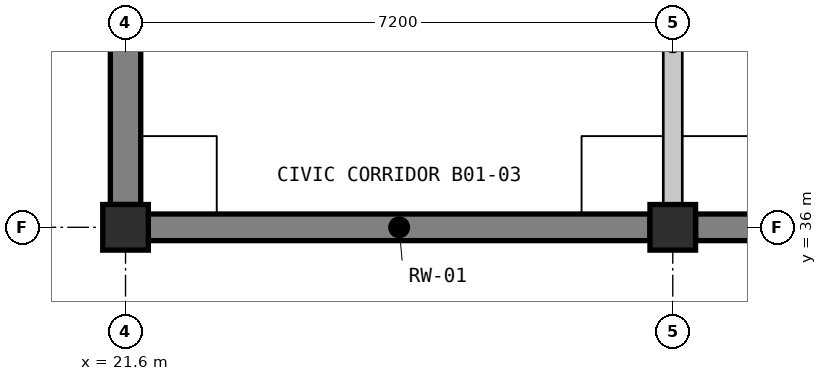
"""IFC4 building model, lengths in metres.
Left out: names, types, materials, properties, quantities, classifications, styles, units other than length and angle.
Written with IfcOpenShell. Run it as: python <this file> out.ifc"""

import sys

from ifc_helpers import new_model, si_unit, direction, frame, frame_2d, origin, origin_2d, place, context, subcontext, project, spatial, rectangle, extrude, element, save


model = new_model("IFC4")
c1 = context("Model", 3, precision=1e-05, world=origin(), true_north=direction((0.0, 1.0)))
c2 = subcontext(c1, "Body", "Model", "MODEL_VIEW")
j1 = project(units=[si_unit("LENGTHUNIT", "METRE"), si_unit("PLANEANGLEUNIT", "RADIAN")], contexts=[c1])
p1 = place(None, origin())
s1 = spatial("IfcSite", under=j1, at=p1, CompositionType="ELEMENT")
p2 = place(p1, origin())
s2 = spatial("IfcBuilding", under=s1, at=p2, CompositionType="ELEMENT")
p3 = place(p2, frame((0.0, 0.0, -4.2)))
s3 = spatial("IfcBuildingStorey", under=s2, at=p3, CompositionType="ELEMENT", Elevation=-4.2)
p4 = place(p3, frame((21.9, 36.0, 0.0), z_axis=(0.0, 0.0, 1.0), x_axis=(1.0, 0.0, 0.0)))
e1 = element("IfcWall", 1, at=p4, inside=s3, PredefinedType="USERDEFINED", context=c2, shape_type="SweptSolid", body=[
    extrude(rectangle(XDim=6.6, YDim=0.35, at=frame_2d((3.3, 0.0))), origin(), (0.0, 0.0, 1.0), 3.98),
])
p5 = place(p3, frame((21.6, 36.3, 0.0), z_axis=(0.0, 0.0, 1.0), x_axis=(0.0, 1.0, 0.0)))
e2 = element("IfcWall", 2, at=p5, inside=s3, PredefinedType="USERDEFINED", context=c2, shape_type="SweptSolid", body=[
    extrude(rectangle(XDim=6.6, YDim=0.4, at=frame_2d((3.3, 0.0))), origin(), (0.0, 0.0, 1.0), 3.98),
])
p6 = place(p3, frame((29.1, 36.0, 0.0), z_axis=(0.0, 0.0, 1.0), x_axis=(1.0, 0.0, 0.0)))
e3 = element("IfcWall", 3, at=p6, inside=s3, PredefinedType="USERDEFINED", context=c2, shape_type="SweptSolid", body=[
    extrude(rectangle(XDim=6.6, YDim=0.35, at=frame_2d((3.3, 0.0))), origin(), (0.0, 0.0, 1.0), 3.98),
])
for number, where, z_axis, x_axis in (
    (4, (21.6, 36.0, 0.0), (0.0, 0.0, 1.0), (1.0, 0.0, 0.0)),
    (5, (28.8, 36.0, 0.0), (0.0, 0.0, 1.0), (1.0, 0.0, 0.0)),
):
    element("IfcColumn", number, at=place(p3, frame(where, z_axis=z_axis, x_axis=x_axis)), inside=s3, PredefinedType="COLUMN", context=c2, shape_type="SweptSolid", body=[
        extrude(rectangle(XDim=0.6, YDim=0.6, at=origin_2d()), origin(), (0.0, 0.0, 1.0), 4.2),
    ])
p7 = place(p3, frame((28.8, 36.12, 0.0), z_axis=(0.0, 0.0, 1.0), x_axis=(0.0, 1.0, 0.0)))
e6 = element("IfcWall", 6, at=p7, inside=s3, PredefinedType="PARTITIONING", context=c2, shape_type="SweptSolid", body=[
    extrude(rectangle(XDim=6.8, YDim=0.25, at=frame_2d((3.4, 0.0))), origin(), (0.0, 0.0, 1.0), 3.368),
])
save(model, sys.argv[1])
